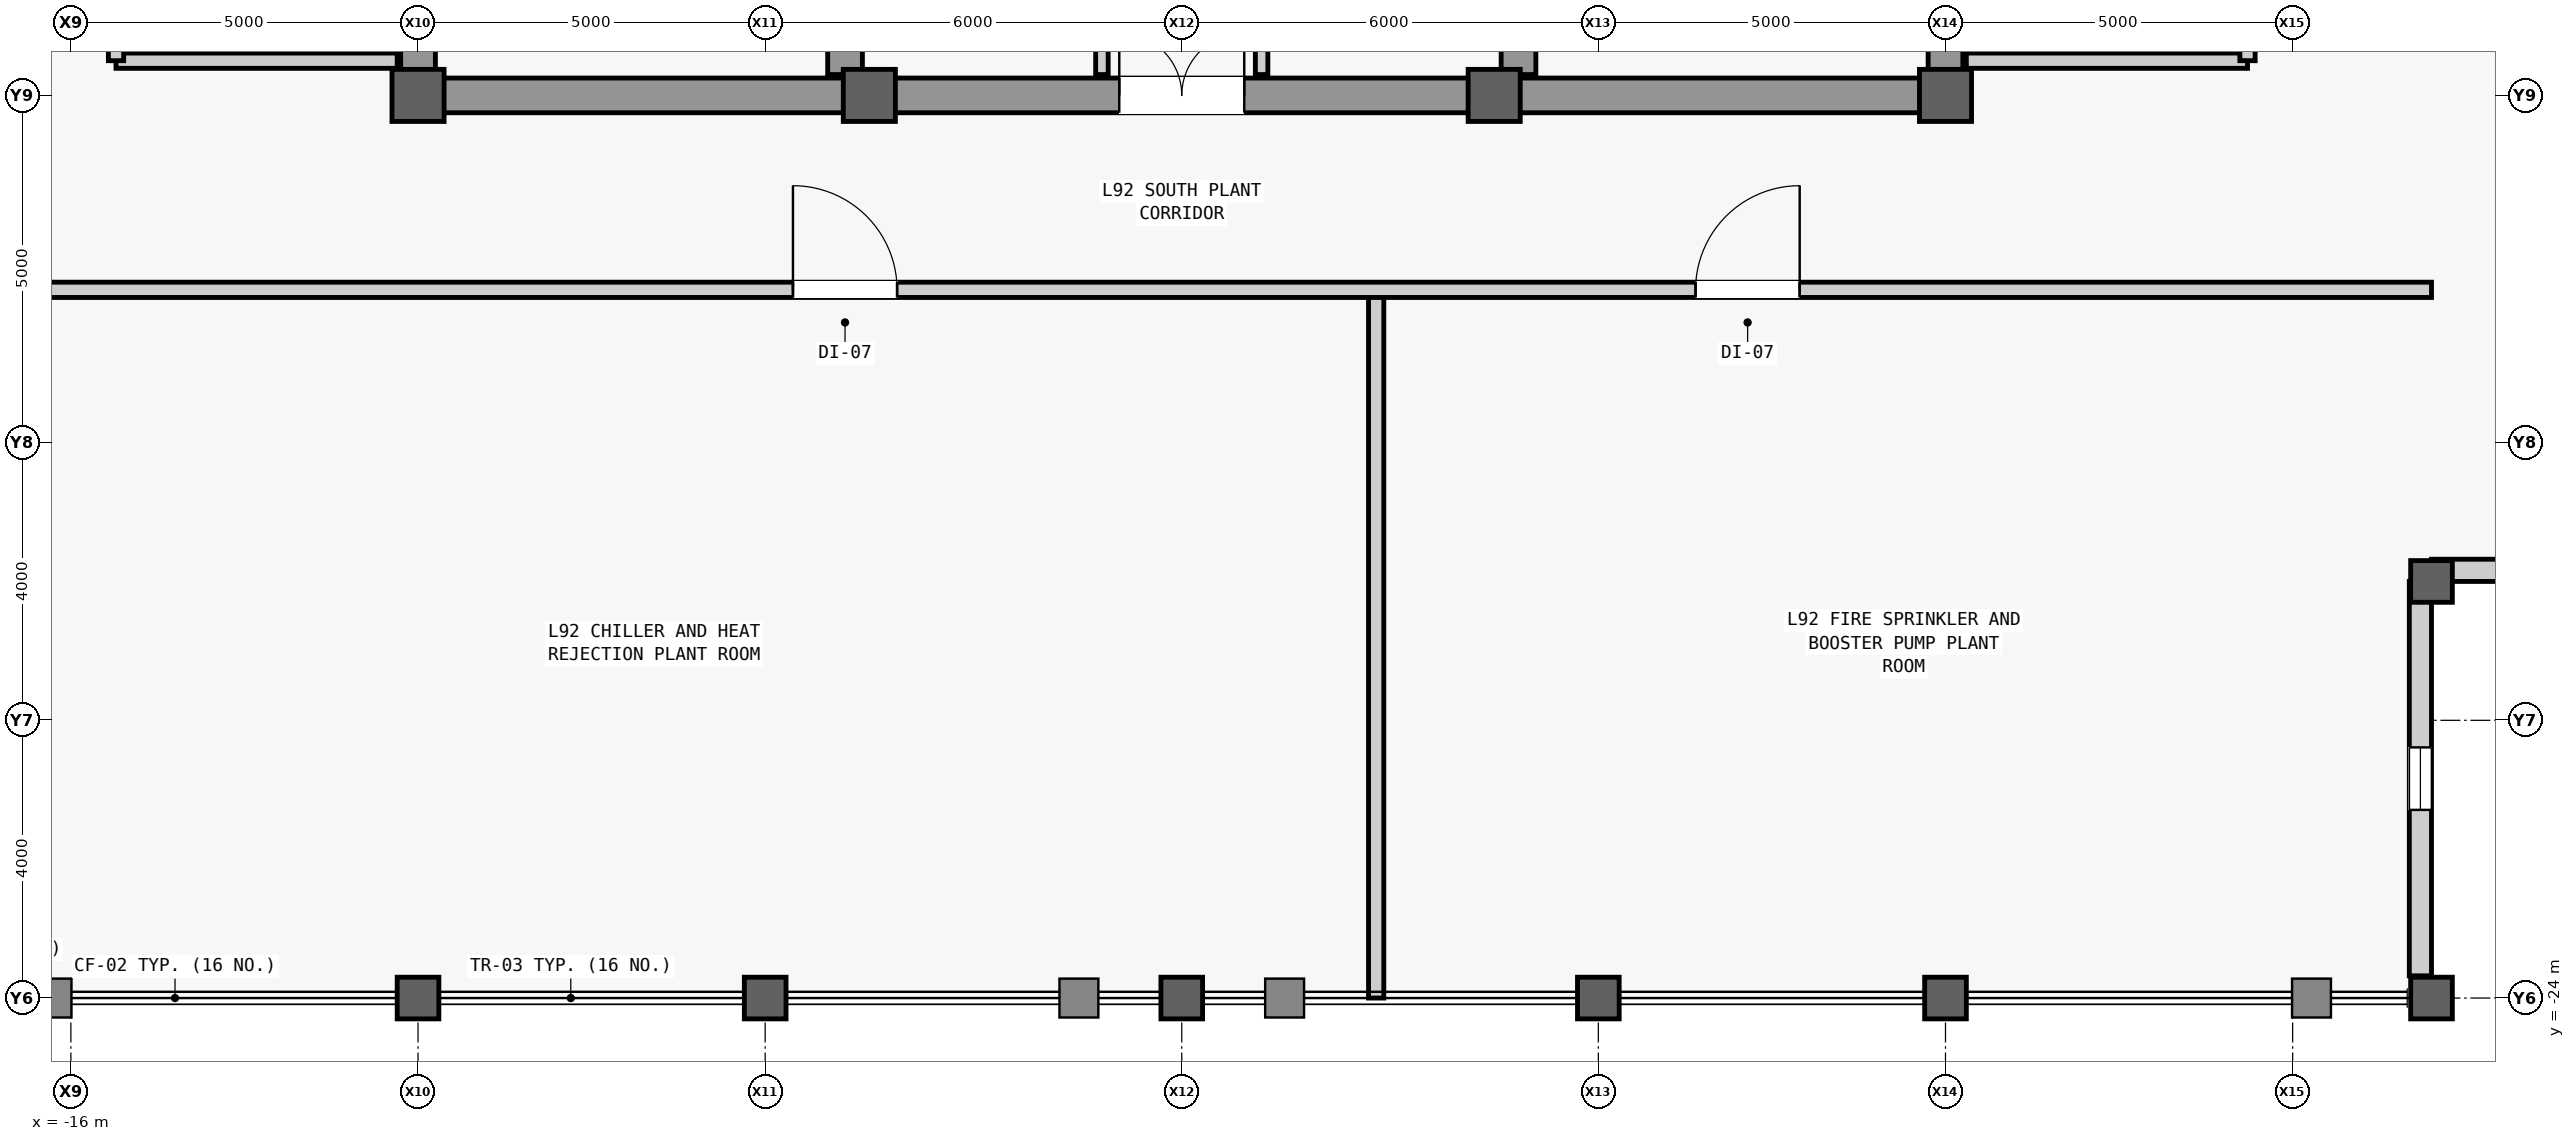
"""IFC4 building model, lengths in metres.
Left out: names, types, materials, properties, quantities, classifications, styles, units other than length and angle.
Written with IfcOpenShell. Run it as: python <this file> out.ifc"""

import sys

from ifc_helpers import new_model, si_unit, direction, frame, frame_2d, origin, origin_2d, place, context, subcontext, project, spatial, rectangle, hollow_rectangle, extrude, source, transform, mapped, element, fill, save


model = new_model("IFC4")
c1 = context("Model", 3, precision=1e-05, world=origin(), true_north=direction((0.0, 1.0)))
c2 = subcontext(c1, "Body", "Model", "MODEL_VIEW")
j1 = project(units=[si_unit("LENGTHUNIT", "METRE"), si_unit("PLANEANGLEUNIT", "RADIAN")], contexts=[c1])
p1 = place(None, origin())
s1 = spatial("IfcSite", under=j1, at=p1, CompositionType="ELEMENT")
p2 = place(p1, origin())
s2 = spatial("IfcBuilding", under=s1, at=p2, CompositionType="ELEMENT")
p3 = place(p2, frame((0.0, 0.0, 389.9)))
s3 = spatial("IfcBuildingStorey", under=s2, at=p3, CompositionType="ELEMENT", Elevation=389.9)
m1 = source(origin(), c2, "Body", "SweptSolid", [
    extrude(rectangle(XDim=22.0, YDim=0.5, at=frame_2d((11.0, 0.0))), origin(), (0.0, 0.0, 1.0), 4.45),
])
p4 = place(p3, frame((-11.0, -11.0, 0.0), z_axis=(0.0, 0.0, 1.0), x_axis=(0.0, 1.0, 0.0)))
e1 = element("IfcWall", 1, at=p4, inside=s3, PredefinedType="SHEAR", context=c2, shape_type="MappedRepresentation", body=[
    mapped(m1, transform((0.0, 0.0, 0.0), scale=1.0)),
])
m2 = source(origin(), c2, "Body", "SweptSolid", [
    extrude(rectangle(XDim=1.1, YDim=2.2, at=frame_2d((0.55, 1.1))), frame((0.0, 0.26, 0.0), z_axis=(0.0, -1.0, 0.0), x_axis=(1.0, 0.0, 0.0)), (0.0, 0.0, 1.0), 0.52),
])
p5 = place(p4, frame((0.8, 0.0, 0.0)))
e2 = element("IfcOpeningElement", 2, at=p5, cuts=e1, PredefinedType="OPENING", context=c2, shape_type="MappedRepresentation", body=[
    mapped(m2, transform((0.0, 0.0, 0.0), scale=1.0)),
])
p6 = place(p4, frame((12.5, 0.0, 0.0)))
e3 = element("IfcOpeningElement", 3, at=p6, cuts=e1, PredefinedType="OPENING", context=c2, shape_type="MappedRepresentation", body=[
    mapped(m2, transform((0.0, 0.0, 0.0), scale=1.0)),
])
m3 = source(origin(), c2, "Body", "SweptSolid", [
    extrude(rectangle(XDim=0.9, YDim=2.15, at=frame_2d((0.45, 1.075))), frame((0.0, 0.26, 0.0), z_axis=(0.0, -1.0, 0.0), x_axis=(1.0, 0.0, 0.0)), (0.0, 0.0, 1.0), 0.52),
])
p7 = place(p4, frame((7.575, 0.0, 0.0)))
e4 = element("IfcOpeningElement", 4, at=p7, cuts=e1, PredefinedType="OPENING", context=c2, shape_type="MappedRepresentation", body=[
    mapped(m3, transform((0.0, 0.0, 0.0), scale=1.0)),
])
m4 = source(origin(), c2, "Body", "SweptSolid", [
    extrude(rectangle(XDim=1.3, YDim=2.3, at=frame_2d((0.65, 1.15))), frame((0.0, 0.26, 0.0), z_axis=(0.0, -1.0, 0.0), x_axis=(1.0, 0.0, 0.0)), (0.0, 0.0, 1.0), 0.52),
])
p8 = place(p4, frame((2.7, 0.0, 0.0)))
e5 = element("IfcOpeningElement", 5, at=p8, cuts=e1, PredefinedType="OPENING", context=c2, shape_type="MappedRepresentation", body=[
    mapped(m4, transform((0.0, 0.0, 0.0), scale=1.0)),
])
p9 = place(p3, frame((11.0, -11.0, 0.0), z_axis=(0.0, 0.0, 1.0), x_axis=(0.0, 1.0, 0.0)))
e6 = element("IfcWall", 6, at=p9, inside=s3, PredefinedType="SHEAR", context=c2, shape_type="MappedRepresentation", body=[
    mapped(m1, transform((0.0, 0.0, 0.0), scale=1.0)),
])
p10 = place(p9, frame((0.8, 0.0, 0.0)))
e7 = element("IfcOpeningElement", 7, at=p10, cuts=e6, PredefinedType="OPENING", context=c2, shape_type="MappedRepresentation", body=[
    mapped(m2, transform((0.0, 0.0, 0.0), scale=1.0)),
])
p11 = place(p9, frame((7.575, 0.0, 0.0)))
e8 = element("IfcOpeningElement", 8, at=p11, cuts=e6, PredefinedType="OPENING", context=c2, shape_type="MappedRepresentation", body=[
    mapped(m3, transform((0.0, 0.0, 0.0), scale=1.0)),
])
p12 = place(p9, frame((2.7, 0.0, 0.0)))
e9 = element("IfcOpeningElement", 9, at=p12, cuts=e6, PredefinedType="OPENING", context=c2, shape_type="MappedRepresentation", body=[
    mapped(m4, transform((0.0, 0.0, 0.0), scale=1.0)),
])
p13 = place(p9, frame((13.35, 0.0, 0.0)))
e10 = element("IfcOpeningElement", 10, at=p13, cuts=e6, PredefinedType="OPENING", context=c2, shape_type="MappedRepresentation", body=[
    mapped(m4, transform((0.0, 0.0, 0.0), scale=1.0)),
])
m5 = source(origin(), c2, "Body", "SweptSolid", [
    extrude(rectangle(XDim=21.4, YDim=0.5, at=frame_2d((10.7, 0.0))), origin(), (0.0, 0.0, 1.0), 4.45),
])
for number, where, z_axis, x_axis in (
    (11, (-4.85, -10.7, 0.0), (0.0, 0.0, 1.0), (0.0, 1.0, 0.0)),
    (12, (4.85, -10.7, 0.0), (0.0, 0.0, 1.0), (0.0, 1.0, 0.0)),
):
    element("IfcWall", number, at=place(p3, frame(where, z_axis=z_axis, x_axis=x_axis)), inside=s3, PredefinedType="SHEAR", context=c2, shape_type="MappedRepresentation", body=[
        mapped(m5, transform((0.0, 0.0, 0.0), scale=1.0)),
    ])
m6 = source(origin(), c2, "Body", "SweptSolid", [
    extrude(rectangle(XDim=5.9, YDim=0.5, at=frame_2d((2.95, 0.0))), origin(), (0.0, 0.0, 1.0), 4.45),
])
for number, where, z_axis, x_axis in (
    (13, (-10.75, -11.0, 0.0), (0.0, 0.0, 1.0), (1.0, 0.0, 0.0)),
    (14, (4.85, -11.0, 0.0), (0.0, 0.0, 1.0), (1.0, 0.0, 0.0)),
):
    element("IfcWall", number, at=place(p3, frame(where, z_axis=z_axis, x_axis=x_axis)), inside=s3, PredefinedType="SHEAR", context=c2, shape_type="MappedRepresentation", body=[
        mapped(m6, transform((0.0, 0.0, 0.0), scale=1.0)),
    ])
m7 = source(origin(), c2, "Body", "SweptSolid", [
    extrude(rectangle(XDim=9.2, YDim=0.5, at=frame_2d((4.6, 0.0))), origin(), (0.0, 0.0, 1.0), 4.45),
])
p14 = place(p3, frame((-4.6, -11.0, 0.0), z_axis=(0.0, 0.0, 1.0), x_axis=(1.0, 0.0, 0.0)))
e15 = element("IfcWall", 15, at=p14, inside=s3, PredefinedType="SHEAR", context=c2, shape_type="MappedRepresentation", body=[
    mapped(m7, transform((0.0, 0.0, 0.0), scale=1.0)),
])
m8 = source(origin(), c2, "Body", "SweptSolid", [
    extrude(rectangle(XDim=1.8, YDim=2.25, at=frame_2d((0.9, 1.125))), frame((0.0, 0.26, 0.0), z_axis=(0.0, -1.0, 0.0), x_axis=(1.0, 0.0, 0.0)), (0.0, 0.0, 1.0), 0.52),
])
p15 = place(p14, frame((3.7, 0.0, 0.0)))
e16 = element("IfcOpeningElement", 16, at=p15, cuts=e15, PredefinedType="OPENING", context=c2, shape_type="MappedRepresentation", body=[
    mapped(m8, transform((0.0, 0.0, 0.0), scale=1.0)),
])
m9 = source(origin(), c2, "Body", "SweptSolid", [
    extrude(hollow_rectangle(XDim=0.6, YDim=0.6, WallThickness=0.035, at=origin_2d()), origin(), (0.0, 0.0, 1.0), 4.8),
])
p16 = place(p3, frame((-11.0, -24.0, 0.0), z_axis=(0.0, 0.0, 1.0), x_axis=(1.0, 0.0, 0.0)))
e17 = element("IfcColumn", 17, at=p16, inside=s3, PredefinedType="COLUMN", context=c2, shape_type="MappedRepresentation", body=[
    mapped(m9, transform((0.0, 0.0, 0.0), scale=1.0)),
])
m10 = source(origin(), c2, "Body", "SweptSolid", [
    extrude(rectangle(XDim=0.75, YDim=0.75, at=origin_2d()), origin(), (0.0, 0.0, 1.0), 4.8),
])
p17 = place(p3, frame((-11.0, -11.0, 0.0), z_axis=(0.0, 0.0, 1.0), x_axis=(1.0, 0.0, 0.0)))
e18 = element("IfcColumn", 18, at=p17, inside=s3, PredefinedType="COLUMN", context=c2, shape_type="MappedRepresentation", body=[
    mapped(m10, transform((0.0, 0.0, 0.0), scale=1.0)),
])
p18 = place(p3, frame((-6.0, -24.0, 0.0), z_axis=(0.0, 0.0, 1.0), x_axis=(1.0, 0.0, 0.0)))
e19 = element("IfcColumn", 19, at=p18, inside=s3, PredefinedType="COLUMN", context=c2, shape_type="MappedRepresentation", body=[
    mapped(m9, transform((0.0, 0.0, 0.0), scale=1.0)),
])
p19 = place(p3, frame((-4.5, -11.0, 0.0), z_axis=(0.0, 0.0, 1.0), x_axis=(1.0, 0.0, 0.0)))
e20 = element("IfcColumn", 20, at=p19, inside=s3, PredefinedType="COLUMN", context=c2, shape_type="MappedRepresentation", body=[
    mapped(m10, transform((0.0, 0.0, 0.0), scale=1.0)),
])
p20 = place(p3, frame((0.0, -24.0, 0.0), z_axis=(0.0, 0.0, 1.0), x_axis=(1.0, 0.0, 0.0)))
e21 = element("IfcColumn", 21, at=p20, inside=s3, PredefinedType="COLUMN", context=c2, shape_type="MappedRepresentation", body=[
    mapped(m9, transform((0.0, 0.0, 0.0), scale=1.0)),
])
p21 = place(p3, frame((4.5, -11.0, 0.0), z_axis=(0.0, 0.0, 1.0), x_axis=(1.0, 0.0, 0.0)))
e22 = element("IfcColumn", 22, at=p21, inside=s3, PredefinedType="COLUMN", context=c2, shape_type="MappedRepresentation", body=[
    mapped(m10, transform((0.0, 0.0, 0.0), scale=1.0)),
])
for number, where, z_axis, x_axis in (
    (23, (6.0, -24.0, 0.0), (0.0, 0.0, 1.0), (1.0, 0.0, 0.0)),
    (24, (11.0, -24.0, 0.0), (0.0, 0.0, 1.0), (1.0, 0.0, 0.0)),
):
    element("IfcColumn", number, at=place(p3, frame(where, z_axis=z_axis, x_axis=x_axis)), inside=s3, PredefinedType="COLUMN", context=c2, shape_type="MappedRepresentation", body=[
        mapped(m9, transform((0.0, 0.0, 0.0), scale=1.0)),
    ])
p22 = place(p3, frame((11.0, -11.0, 0.0), z_axis=(0.0, 0.0, 1.0), x_axis=(1.0, 0.0, 0.0)))
e25 = element("IfcColumn", 25, at=p22, inside=s3, PredefinedType="COLUMN", context=c2, shape_type="MappedRepresentation", body=[
    mapped(m10, transform((0.0, 0.0, 0.0), scale=1.0)),
])
for number, where, z_axis, x_axis in (
    (26, (18.0, -24.0, 0.0), (0.0, 0.0, 1.0), (1.0, 0.0, 0.0)),
    (27, (18.0, -18.0, 0.0), (0.0, 0.0, 1.0), (1.0, 0.0, 0.0)),
):
    element("IfcColumn", number, at=place(p3, frame(where, z_axis=z_axis, x_axis=x_axis)), inside=s3, PredefinedType="COLUMN", context=c2, shape_type="MappedRepresentation", body=[
        mapped(m9, transform((0.0, 0.0, 0.0), scale=1.0)),
    ])
m11 = source(origin(), c2, "Body", "SweptSolid", [
    extrude(rectangle(XDim=5.68, YDim=0.32, at=frame_2d((2.84, 0.0))), origin(), (0.0, 0.0, 1.0), 3.901),
])
p23 = place(p3, frame((17.84, -23.68, 0.0), z_axis=(0.0, 0.0, 1.0), x_axis=(0.0, 1.0, 0.0)))
e28 = element("IfcWall", 28, at=p23, inside=s3, PredefinedType="STANDARD", context=c2, shape_type="MappedRepresentation", body=[
    mapped(m11, transform((0.0, 0.0, 0.0), scale=1.0)),
])
m12 = source(origin(), c2, "Body", "SweptSolid", [
    extrude(rectangle(XDim=0.9, YDim=2.4, at=frame_2d((0.45, 1.2))), frame((0.0, 0.17, 0.0), z_axis=(0.0, -1.0, 0.0), x_axis=(1.0, 0.0, 0.0)), (0.0, 0.0, 1.0), 0.34),
])
p24 = place(p23, frame((2.39, 0.0, 0.7)))
e29 = element("IfcOpeningElement", 29, at=p24, cuts=e28, PredefinedType="OPENING", context=c2, shape_type="MappedRepresentation", body=[
    mapped(m12, transform((0.0, 0.0, 0.0), scale=1.0)),
])
p25 = place(p3, frame((18.0, -17.84, 0.0), z_axis=(0.0, 0.0, 1.0), x_axis=(1.0, 0.0, 0.0)))
e30 = element("IfcWall", 30, at=p25, inside=s3, PredefinedType="STANDARD", context=c2, shape_type="MappedRepresentation", body=[
    mapped(m11, transform((0.0, 0.0, 0.0), scale=1.0)),
])
p26 = place(p25, frame((2.39, 0.0, 0.7)))
e31 = element("IfcOpeningElement", 31, at=p26, cuts=e30, PredefinedType="OPENING", context=c2, shape_type="MappedRepresentation", body=[
    mapped(m12, transform((0.0, 0.0, 0.0), scale=1.0)),
])
m13 = source(origin(), c2, "Body", "SweptSolid", [
    extrude(rectangle(XDim=4.05, YDim=0.22, at=frame_2d((2.025, 0.0))), origin(), (0.0, 0.0, 1.0), 4.45),
])
p27 = place(p3, frame((-15.35, -10.5, 0.0), z_axis=(0.0, 0.0, 1.0), x_axis=(1.0, 0.0, 0.0)))
e32 = element("IfcWall", 32, at=p27, inside=s3, PredefinedType="PARTITIONING", context=c2, shape_type="MappedRepresentation", body=[
    mapped(m13, transform((0.0, 0.0, 0.0), scale=1.0)),
])
m14 = source(origin(), c2, "Body", "SweptSolid", [
    extrude(rectangle(XDim=4.4, YDim=0.22, at=frame_2d((2.2, 0.0))), origin(), (0.0, 0.0, 1.0), 4.45),
])
p28 = place(p3, frame((-15.35, -10.5, 0.0), z_axis=(0.0, 0.0, 1.0), x_axis=(0.0, 1.0, 0.0)))
e33 = element("IfcWall", 33, at=p28, inside=s3, PredefinedType="PARTITIONING", context=c2, shape_type="MappedRepresentation", body=[
    mapped(m14, transform((0.0, 0.0, 0.0), scale=1.0)),
])
m15 = source(origin(), c2, "Body", "SweptSolid", [
    extrude(rectangle(XDim=1.2, YDim=2.2, at=frame_2d((0.6, 1.1))), frame((0.0, 0.12, 0.0), z_axis=(0.0, -1.0, 0.0), x_axis=(1.0, 0.0, 0.0)), (0.0, 0.0, 1.0), 0.24),
])
p29 = place(p28, frame((1.6, 0.0, 0.0)))
e34 = element("IfcOpeningElement", 34, at=p29, cuts=e33, PredefinedType="OPENING", context=c2, shape_type="MappedRepresentation", body=[
    mapped(m15, transform((0.0, 0.0, 0.0), scale=1.0)),
])
p30 = place(p3, frame((11.3, -10.5, 0.0), z_axis=(0.0, 0.0, 1.0), x_axis=(1.0, 0.0, 0.0)))
e35 = element("IfcWall", 35, at=p30, inside=s3, PredefinedType="PARTITIONING", context=c2, shape_type="MappedRepresentation", body=[
    mapped(m13, transform((0.0, 0.0, 0.0), scale=1.0)),
])
p31 = place(p3, frame((15.35, -10.5, 0.0), z_axis=(0.0, 0.0, 1.0), x_axis=(0.0, 1.0, 0.0)))
e36 = element("IfcWall", 36, at=p31, inside=s3, PredefinedType="PARTITIONING", context=c2, shape_type="MappedRepresentation", body=[
    mapped(m14, transform((0.0, 0.0, 0.0), scale=1.0)),
])
p32 = place(p31, frame((1.6, 0.0, 0.0)))
e37 = element("IfcOpeningElement", 37, at=p32, cuts=e36, PredefinedType="OPENING", context=c2, shape_type="MappedRepresentation", body=[
    mapped(m15, transform((0.0, 0.0, 0.0), scale=1.0)),
])
m16 = source(origin(), c2, "Body", "SweptSolid", [
    extrude(rectangle(XDim=5.4, YDim=0.18, at=frame_2d((2.7, 0.0))), origin(), (0.0, 0.0, 1.0), 4.45),
])
p33 = place(p3, frame((-1.15, -10.7, 0.0), z_axis=(0.0, 0.0, 1.0), x_axis=(0.0, 1.0, 0.0)))
e38 = element("IfcWall", 38, at=p33, inside=s3, PredefinedType="PARTITIONING", context=c2, shape_type="MappedRepresentation", body=[
    mapped(m16, transform((0.0, 0.0, 0.0), scale=1.0)),
])
m17 = source(origin(), c2, "Body", "SweptSolid", [
    extrude(rectangle(XDim=0.9, YDim=2.15, at=frame_2d((0.45, 1.075))), frame((0.0, 0.1, 0.0), z_axis=(0.0, -1.0, 0.0), x_axis=(1.0, 0.0, 0.0)), (0.0, 0.0, 1.0), 0.2),
])
p34 = place(p33, frame((1.15, 0.0, 0.0)))
e39 = element("IfcOpeningElement", 39, at=p34, cuts=e38, PredefinedType="OPENING", context=c2, shape_type="MappedRepresentation", body=[
    mapped(m17, transform((0.0, 0.0, 0.0), scale=1.0)),
])
p35 = place(p33, frame((3.85, 0.0, 0.0)))
e40 = element("IfcOpeningElement", 40, at=p35, cuts=e38, PredefinedType="OPENING", context=c2, shape_type="MappedRepresentation", body=[
    mapped(m17, transform((0.0, 0.0, 0.0), scale=1.0)),
])
p36 = place(p3, frame((1.15, -10.7, 0.0), z_axis=(0.0, 0.0, 1.0), x_axis=(0.0, 1.0, 0.0)))
e41 = element("IfcWall", 41, at=p36, inside=s3, PredefinedType="PARTITIONING", context=c2, shape_type="MappedRepresentation", body=[
    mapped(m16, transform((0.0, 0.0, 0.0), scale=1.0)),
])
p37 = place(p36, frame((2.25, 0.0, 0.0)))
e42 = element("IfcOpeningElement", 42, at=p37, cuts=e41, PredefinedType="OPENING", context=c2, shape_type="MappedRepresentation", body=[
    mapped(m17, transform((0.0, 0.0, 0.0), scale=1.0)),
])
m18 = source(origin(), c2, "Body", "SweptSolid", [
    extrude(rectangle(XDim=10.2, YDim=0.22, at=frame_2d((5.1, 0.0))), origin(), (0.0, 0.0, 1.0), 4.45),
])
p38 = place(p3, frame((2.8, -24.0, 0.0), z_axis=(0.0, 0.0, 1.0), x_axis=(0.0, 1.0, 0.0)))
e43 = element("IfcWall", 43, at=p38, inside=s3, PredefinedType="PARTITIONING", context=c2, shape_type="MappedRepresentation", body=[
    mapped(m18, transform((0.0, 0.0, 0.0), scale=1.0)),
])
m19 = source(origin(), c2, "Body", "SweptSolid", [
    extrude(rectangle(XDim=36.0, YDim=0.22, at=frame_2d((18.0, 0.0))), origin(), (0.0, 0.0, 1.0), 4.45),
])
p39 = place(p3, frame((-18.0, -13.8, 0.0), z_axis=(0.0, 0.0, 1.0), x_axis=(1.0, 0.0, 0.0)))
e44 = element("IfcWall", 44, at=p39, inside=s3, PredefinedType="PARTITIONING", context=c2, shape_type="MappedRepresentation", body=[
    mapped(m19, transform((0.0, 0.0, 0.0), scale=1.0)),
])
m20 = source(origin(), c2, "Body", "SweptSolid", [
    extrude(rectangle(XDim=1.5, YDim=2.3, at=frame_2d((0.75, 1.15))), frame((0.0, 0.12, 0.0), z_axis=(0.0, -1.0, 0.0), x_axis=(1.0, 0.0, 0.0)), (0.0, 0.0, 1.0), 0.24),
])
p40 = place(p39, frame((12.4, 0.0, 0.0)))
e45 = element("IfcOpeningElement", 45, at=p40, cuts=e44, PredefinedType="OPENING", context=c2, shape_type="MappedRepresentation", body=[
    mapped(m20, transform((0.0, 0.0, 0.0), scale=1.0)),
])
p41 = place(p39, frame((25.4, 0.0, 0.0)))
e46 = element("IfcOpeningElement", 46, at=p41, cuts=e44, PredefinedType="OPENING", context=c2, shape_type="MappedRepresentation", body=[
    mapped(m20, transform((0.0, 0.0, 0.0), scale=1.0)),
])
m21 = source(origin(), c2, "Body", "SweptSolid", [
    extrude(rectangle(XDim=0.9, YDim=2.4, at=frame_2d((0.45, 1.2))), frame((0.0, 0.03, 0.0), z_axis=(0.0, -1.0, 0.0), x_axis=(1.0, 0.0, 0.0)), (0.0, 0.0, 1.0), 0.06),
])
p42 = place(p24, origin())
e47 = element("IfcWindow", 47, at=p42, inside=s3, PartitioningType="SINGLE_PANEL", PredefinedType="WINDOW", context=c2, shape_type="MappedRepresentation", body=[
    mapped(m21, transform((0.0, 0.0, 0.0), scale=1.0)),
])
fill(e29, e47)
m22 = source(origin(), c2, "Body", "SweptSolid", [
    extrude(rectangle(XDim=1.8, YDim=2.25, at=frame_2d((0.9, 1.125))), frame((0.0, 0.025, 0.0), z_axis=(0.0, -1.0, 0.0), x_axis=(1.0, 0.0, 0.0)), (0.0, 0.0, 1.0), 0.05),
])
p43 = place(p15, origin())
e48 = element("IfcDoor", 48, at=p43, inside=s3, OperationType="SINGLE_SWING_LEFT", PredefinedType="DOOR", context=c2, shape_type="MappedRepresentation", body=[
    mapped(m22, transform((0.0, 0.0, 0.0), scale=1.0)),
])
fill(e16, e48)
m23 = source(origin(), c2, "Body", "SweptSolid", [
    extrude(rectangle(XDim=1.5, YDim=2.3, at=frame_2d((0.75, 1.15))), frame((0.0, 0.025, 0.0), z_axis=(0.0, -1.0, 0.0), x_axis=(1.0, 0.0, 0.0)), (0.0, 0.0, 1.0), 0.05),
])
p44 = place(p40, origin())
e49 = element("IfcDoor", 49, at=p44, inside=s3, OperationType="SINGLE_SWING_LEFT", PredefinedType="DOOR", context=c2, shape_type="MappedRepresentation", body=[
    mapped(m23, transform((0.0, 0.0, 0.0), scale=1.0)),
])
fill(e45, e49)
p45 = place(p41, origin())
e50 = element("IfcDoor", 50, at=p45, inside=s3, OperationType="SINGLE_SWING_RIGHT", PredefinedType="DOOR", context=c2, shape_type="MappedRepresentation", body=[
    mapped(m23, transform((0.0, 0.0, 0.0), scale=1.0)),
])
fill(e46, e50)
save(model, sys.argv[1])
